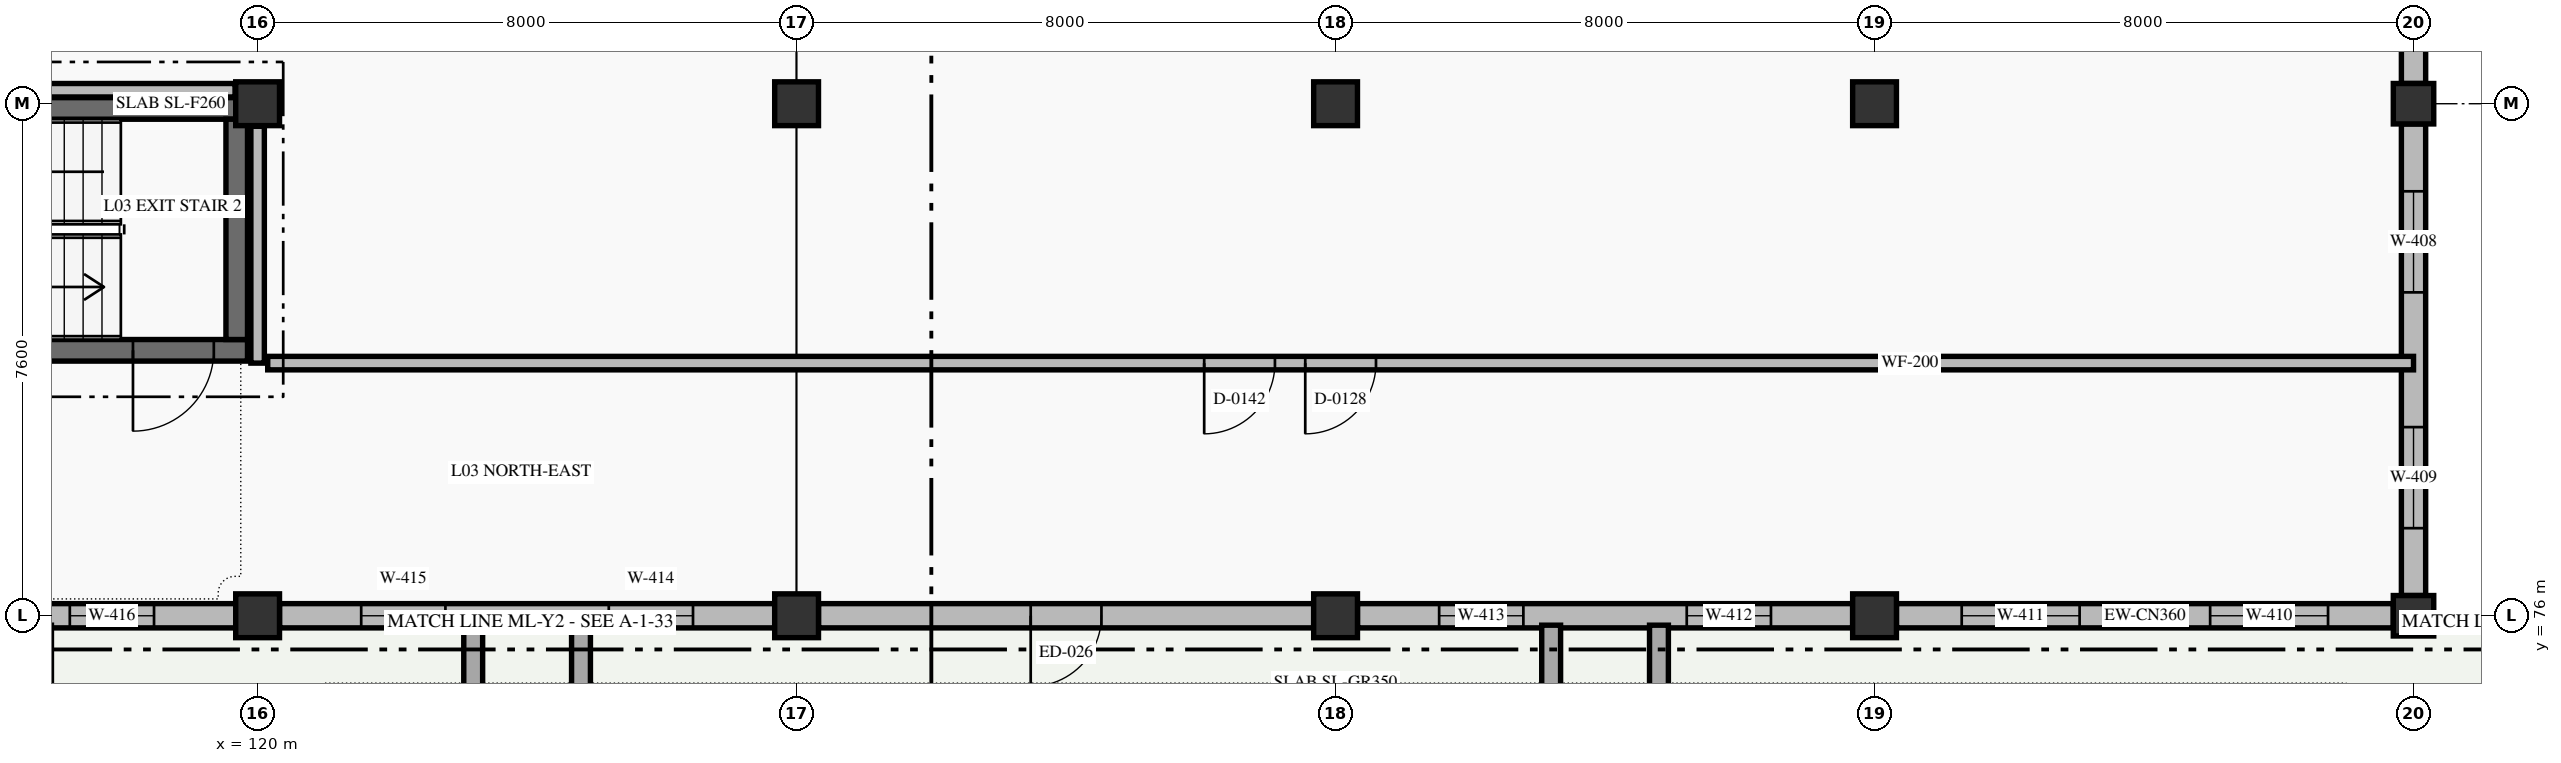
"""IFC4 building model, lengths in metres.
Left out: names, types, materials, properties, quantities, classifications, styles, units other than length and angle.
Written with IfcOpenShell. Run it as: python <this file> out.ifc"""

import sys

from ifc_helpers import new_model, si_unit, direction, frame, frame_2d, origin, origin_2d, place, context, subcontext, project, spatial, rectangle, extrude, element, fill, save


model = new_model("IFC4")
c1 = context("Model", 3, precision=1e-05, world=origin(), true_north=direction((0.0, 1.0)))
c2 = subcontext(c1, "Body", "Model", "MODEL_VIEW")
j1 = project(units=[si_unit("LENGTHUNIT", "METRE"), si_unit("PLANEANGLEUNIT", "RADIAN")], contexts=[c1])
p1 = place(None, origin())
s1 = spatial("IfcSite", under=j1, at=p1, CompositionType="ELEMENT")
p2 = place(p1, origin())
s2 = spatial("IfcBuilding", under=s1, at=p2, CompositionType="ELEMENT")
p3 = place(p2, frame((0.0, 0.0, 10.2)))
s3 = spatial("IfcBuildingStorey", under=s2, at=p3, CompositionType="ELEMENT", Elevation=10.2)
for number, where, z_axis, x_axis in (
    (1, (120.0, 76.0, 0.0), (0.0, 0.0, 1.0), (1.0, 0.0, 0.0)),
    (2, (120.0, 83.6, 0.0), (0.0, 0.0, 1.0), (1.0, 0.0, 0.0)),
    (3, (128.0, 76.0, 0.0), (0.0, 0.0, 1.0), (1.0, 0.0, 0.0)),
    (4, (128.0, 83.6, 0.0), (0.0, 0.0, 1.0), (1.0, 0.0, 0.0)),
    (5, (136.0, 76.0, 0.0), (0.0, 0.0, 1.0), (1.0, 0.0, 0.0)),
    (6, (136.0, 83.6, 0.0), (0.0, 0.0, 1.0), (1.0, 0.0, 0.0)),
    (7, (144.0, 76.0, 0.0), (0.0, 0.0, 1.0), (1.0, 0.0, 0.0)),
    (8, (144.0, 83.6, 0.0), (0.0, 0.0, 1.0), (1.0, 0.0, 0.0)),
):
    element("IfcColumn", number, at=place(p3, frame(where, z_axis=z_axis, x_axis=x_axis)), inside=s3, PredefinedType="COLUMN", context=c2, shape_type="SweptSolid", body=[
        extrude(rectangle(XDim=0.65, YDim=0.65, at=origin_2d()), origin(), (0.0, 0.0, 1.0), 4.5),
    ])
for number, where, z_axis, x_axis in (
    (9, (152.0, 76.0, 0.0), (0.0, 0.0, 1.0), (1.0, 0.0, 0.0)),
    (10, (152.0, 83.6, 0.0), (0.0, 0.0, 1.0), (1.0, 0.0, 0.0)),
):
    element("IfcColumn", number, at=place(p3, frame(where, z_axis=z_axis, x_axis=x_axis)), inside=s3, PredefinedType="COLUMN", context=c2, shape_type="SweptSolid", body=[
        extrude(rectangle(XDim=0.6, YDim=0.6, at=origin_2d()), origin(), (0.0, 0.0, 1.0), 4.5),
    ])
p4 = place(p3, frame((152.0, 90.9, 0.0), z_axis=(0.0, 0.0, 1.0), x_axis=(0.0, -1.0, 0.0)))
e11 = element("IfcWall", 11, at=p4, inside=s3, PredefinedType="STANDARD", context=c2, shape_type="SweptSolid", body=[
    extrude(rectangle(XDim=7.0, YDim=0.36, at=frame_2d((3.5, 0.0))), origin(), (0.0, 0.0, 1.0), 4.22),
])
p5 = place(p4, frame((1.0, 0.0, 0.9)))
e12 = element("IfcOpeningElement", 12, at=p5, cuts=e11, PredefinedType="OPENING", context=c2, shape_type="SweptSolid", body=[
    extrude(rectangle(XDim=1.5, YDim=2.0, at=frame_2d((0.75, 1.0))), frame((0.0, 0.19, 0.0), z_axis=(0.0, -1.0, 0.0), x_axis=(1.0, 0.0, 0.0)), (0.0, 0.0, 1.0), 0.38),
])
p6 = place(p4, frame((4.5, 0.0, 0.9)))
e13 = element("IfcOpeningElement", 13, at=p6, cuts=e11, PredefinedType="OPENING", context=c2, shape_type="SweptSolid", body=[
    extrude(rectangle(XDim=1.5, YDim=2.0, at=frame_2d((0.75, 1.0))), frame((0.0, 0.19, 0.0), z_axis=(0.0, -1.0, 0.0), x_axis=(1.0, 0.0, 0.0)), (0.0, 0.0, 1.0), 0.38),
])
p7 = place(p3, frame((152.0, 83.3, 0.0), z_axis=(0.0, 0.0, 1.0), x_axis=(0.0, -1.0, 0.0)))
e14 = element("IfcWall", 14, at=p7, inside=s3, PredefinedType="STANDARD", context=c2, shape_type="SweptSolid", body=[
    extrude(rectangle(XDim=7.0, YDim=0.36, at=frame_2d((3.5, 0.0))), origin(), (0.0, 0.0, 1.0), 4.22),
])
p8 = place(p7, frame((1.0, 0.0, 0.9)))
e15 = element("IfcOpeningElement", 15, at=p8, cuts=e14, PredefinedType="OPENING", context=c2, shape_type="SweptSolid", body=[
    extrude(rectangle(XDim=1.5, YDim=2.0, at=frame_2d((0.75, 1.0))), frame((0.0, 0.19, 0.0), z_axis=(0.0, -1.0, 0.0), x_axis=(1.0, 0.0, 0.0)), (0.0, 0.0, 1.0), 0.38),
])
p9 = place(p7, frame((4.5, 0.0, 0.9)))
e16 = element("IfcOpeningElement", 16, at=p9, cuts=e14, PredefinedType="OPENING", context=c2, shape_type="SweptSolid", body=[
    extrude(rectangle(XDim=1.5, YDim=2.0, at=frame_2d((0.75, 1.0))), frame((0.0, 0.19, 0.0), z_axis=(0.0, -1.0, 0.0), x_axis=(1.0, 0.0, 0.0)), (0.0, 0.0, 1.0), 0.38),
])
p10 = place(p3, frame((151.7, 76.0, 0.0), z_axis=(0.0, 0.0, 1.0), x_axis=(-1.0, 0.0, 0.0)))
e17 = element("IfcWall", 17, at=p10, inside=s3, PredefinedType="STANDARD", context=c2, shape_type="SweptSolid", body=[
    extrude(rectangle(XDim=7.375, YDim=0.36, at=frame_2d((3.688, 0.0))), origin(), (0.0, 0.0, 1.0), 4.22),
])
p11 = place(p10, frame((0.969, 0.0, 0.9)))
e18 = element("IfcOpeningElement", 18, at=p11, cuts=e17, PredefinedType="OPENING", context=c2, shape_type="SweptSolid", body=[
    extrude(rectangle(XDim=1.75, YDim=2.45, at=frame_2d((0.875, 1.225))), frame((0.0, 0.19, 0.0), z_axis=(0.0, -1.0, 0.0), x_axis=(1.0, 0.0, 0.0)), (0.0, 0.0, 1.0), 0.38),
])
p12 = place(p10, frame((4.656, 0.0, 0.9)))
e19 = element("IfcOpeningElement", 19, at=p12, cuts=e17, PredefinedType="OPENING", context=c2, shape_type="SweptSolid", body=[
    extrude(rectangle(XDim=1.75, YDim=2.45, at=frame_2d((0.875, 1.225))), frame((0.0, 0.19, 0.0), z_axis=(0.0, -1.0, 0.0), x_axis=(1.0, 0.0, 0.0)), (0.0, 0.0, 1.0), 0.38),
])
p13 = place(p3, frame((143.675, 76.0, 0.0), z_axis=(0.0, 0.0, 1.0), x_axis=(-1.0, 0.0, 0.0)))
e20 = element("IfcWall", 20, at=p13, inside=s3, PredefinedType="STANDARD", context=c2, shape_type="SweptSolid", body=[
    extrude(rectangle(XDim=7.35, YDim=0.36, at=frame_2d((3.675, 0.0))), origin(), (0.0, 0.0, 1.0), 3.47),
])
p14 = place(p13, frame((1.212, 0.0, 2.22)))
e21 = element("IfcOpeningElement", 21, at=p14, cuts=e20, PredefinedType="OPENING", context=c2, shape_type="SweptSolid", body=[
    extrude(rectangle(XDim=1.25, YDim=0.95, at=frame_2d((0.625, 0.475))), frame((0.0, 0.19, 0.0), z_axis=(0.0, -1.0, 0.0), x_axis=(1.0, 0.0, 0.0)), (0.0, 0.0, 1.0), 0.38),
])
p15 = place(p13, frame((4.887, 0.0, 2.22)))
e22 = element("IfcOpeningElement", 22, at=p15, cuts=e20, PredefinedType="OPENING", context=c2, shape_type="SweptSolid", body=[
    extrude(rectangle(XDim=1.25, YDim=0.95, at=frame_2d((0.625, 0.475))), frame((0.0, 0.19, 0.0), z_axis=(0.0, -1.0, 0.0), x_axis=(1.0, 0.0, 0.0)), (0.0, 0.0, 1.0), 0.38),
])
p16 = place(p3, frame((135.675, 76.0, 0.0), z_axis=(0.0, 0.0, 1.0), x_axis=(-1.0, 0.0, 0.0)))
e23 = element("IfcWall", 23, at=p16, inside=s3, PredefinedType="STANDARD", context=c2, shape_type="SweptSolid", body=[
    extrude(rectangle(XDim=7.35, YDim=0.36, at=frame_2d((3.675, 0.0))), origin(), (0.0, 0.0, 1.0), 3.47),
])
p17 = place(p16, frame((3.15, 0.0, 0.0)))
e24 = element("IfcOpeningElement", 24, at=p17, cuts=e23, PredefinedType="OPENING", context=c2, shape_type="SweptSolid", body=[
    extrude(rectangle(XDim=1.05, YDim=2.2, at=frame_2d((0.525, 1.1))), frame((0.0, 0.19, 0.0), z_axis=(0.0, -1.0, 0.0), x_axis=(1.0, 0.0, 0.0)), (0.0, 0.0, 1.0), 0.38),
])
p18 = place(p3, frame((127.675, 76.0, 0.0), z_axis=(0.0, 0.0, 1.0), x_axis=(-1.0, 0.0, 0.0)))
e25 = element("IfcWall", 25, at=p18, inside=s3, PredefinedType="STANDARD", context=c2, shape_type="SweptSolid", body=[
    extrude(rectangle(XDim=7.35, YDim=0.36, at=frame_2d((3.675, 0.0))), origin(), (0.0, 0.0, 1.0), 3.47),
])
p19 = place(p18, frame((1.212, 0.0, 2.22)))
e26 = element("IfcOpeningElement", 26, at=p19, cuts=e25, PredefinedType="OPENING", context=c2, shape_type="SweptSolid", body=[
    extrude(rectangle(XDim=1.25, YDim=0.95, at=frame_2d((0.625, 0.475))), frame((0.0, 0.19, 0.0), z_axis=(0.0, -1.0, 0.0), x_axis=(1.0, 0.0, 0.0)), (0.0, 0.0, 1.0), 0.38),
])
p20 = place(p18, frame((4.887, 0.0, 2.22)))
e27 = element("IfcOpeningElement", 27, at=p20, cuts=e25, PredefinedType="OPENING", context=c2, shape_type="SweptSolid", body=[
    extrude(rectangle(XDim=1.25, YDim=0.95, at=frame_2d((0.625, 0.475))), frame((0.0, 0.19, 0.0), z_axis=(0.0, -1.0, 0.0), x_axis=(1.0, 0.0, 0.0)), (0.0, 0.0, 1.0), 0.38),
])
p21 = place(p3, frame((119.675, 76.0, 0.0), z_axis=(0.0, 0.0, 1.0), x_axis=(-1.0, 0.0, 0.0)))
e28 = element("IfcWall", 28, at=p21, inside=s3, PredefinedType="STANDARD", context=c2, shape_type="SweptSolid", body=[
    extrude(rectangle(XDim=7.35, YDim=0.36, at=frame_2d((3.675, 0.0))), origin(), (0.0, 0.0, 1.0), 3.47),
])
p22 = place(p21, frame((1.212, 0.0, 2.22)))
e29 = element("IfcOpeningElement", 29, at=p22, cuts=e28, PredefinedType="OPENING", context=c2, shape_type="SweptSolid", body=[
    extrude(rectangle(XDim=1.25, YDim=0.95, at=frame_2d((0.625, 0.475))), frame((0.0, 0.19, 0.0), z_axis=(0.0, -1.0, 0.0), x_axis=(1.0, 0.0, 0.0)), (0.0, 0.0, 1.0), 0.38),
])
p23 = place(p21, frame((4.887, 0.0, 2.22)))
e30 = element("IfcOpeningElement", 30, at=p23, cuts=e28, PredefinedType="OPENING", context=c2, shape_type="SweptSolid", body=[
    extrude(rectangle(XDim=1.25, YDim=0.95, at=frame_2d((0.625, 0.475))), frame((0.0, 0.19, 0.0), z_axis=(0.0, -1.0, 0.0), x_axis=(1.0, 0.0, 0.0)), (0.0, 0.0, 1.0), 0.38),
])
p24 = place(p3, frame((119.85, 79.94, 0.0), z_axis=(0.0, 0.0, 1.0), x_axis=(-1.0, 0.0, 0.0)))
e31 = element("IfcWall", 31, at=p24, inside=s3, PredefinedType="SHEAR", context=c2, shape_type="SweptSolid", body=[
    extrude(rectangle(XDim=7.7, YDim=0.32, at=frame_2d((3.85, 0.0))), origin(), (0.0, 0.0, 1.0), 4.5),
])
p25 = place(p24, frame((0.5, 0.0, 0.0)))
e32 = element("IfcOpeningElement", 32, at=p25, cuts=e31, PredefinedType="OPENING", context=c2, shape_type="SweptSolid", body=[
    extrude(rectangle(XDim=1.2, YDim=2.2, at=frame_2d((0.6, 1.1))), frame((0.0, 0.17, 0.0), z_axis=(0.0, -1.0, 0.0), x_axis=(1.0, 0.0, 0.0)), (0.0, 0.0, 1.0), 0.34),
])
p26 = place(p3, frame((112.15, 83.53, 0.0), z_axis=(0.0, 0.0, 1.0), x_axis=(1.0, 0.0, 0.0)))
e33 = element("IfcWall", 33, at=p26, inside=s3, PredefinedType="SHEAR", context=c2, shape_type="SweptSolid", body=[
    extrude(rectangle(XDim=7.7, YDim=0.32, at=frame_2d((3.85, 0.0))), origin(), (0.0, 0.0, 1.0), 4.5),
])
p27 = place(p3, frame((119.69, 83.37, 0.0), z_axis=(0.0, 0.0, 1.0), x_axis=(0.0, -1.0, 0.0)))
e34 = element("IfcWall", 34, at=p27, inside=s3, PredefinedType="SHEAR", context=c2, shape_type="SweptSolid", body=[
    extrude(rectangle(XDim=3.27, YDim=0.32, at=frame_2d((1.635, 0.0))), origin(), (0.0, 0.0, 1.0), 4.5),
])
p28 = place(p3, frame((112.335, 83.8, 0.0), z_axis=(0.0, 0.0, 1.0), x_axis=(1.0, 0.0, 0.0)))
e35 = element("IfcWall", 35, at=p28, inside=s3, PredefinedType="STANDARD", context=c2, shape_type="SweptSolid", body=[
    extrude(rectangle(XDim=7.33, YDim=0.2, at=frame_2d((3.665, 0.0))), origin(), (0.0, 0.0, 1.0), 3.47),
])
p29 = place(p3, frame((120.0, 83.265, 0.0), z_axis=(0.0, 0.0, 1.0), x_axis=(0.0, -1.0, 0.0)))
e36 = element("IfcWall", 36, at=p29, inside=s3, PredefinedType="STANDARD", context=c2, shape_type="SweptSolid", body=[
    extrude(rectangle(XDim=3.515, YDim=0.2, at=frame_2d((1.757, 0.0))), origin(), (0.0, 0.0, 1.0), 3.67),
])
p30 = place(p3, frame((152.0, 79.75, 0.0), z_axis=(0.0, 0.0, 1.0), x_axis=(-1.0, 0.0, 0.0)))
e37 = element("IfcWall", 37, at=p30, inside=s3, PredefinedType="STANDARD", context=c2, shape_type="SweptSolid", body=[
    extrude(rectangle(XDim=31.85, YDim=0.2, at=frame_2d((15.925, 0.0))), origin(), (0.0, 0.0, 1.0), 4.26),
])
p31 = place(p30, frame((15.4, 0.0, 0.0)))
e38 = element("IfcOpeningElement", 38, at=p31, cuts=e37, PredefinedType="OPENING", context=c2, shape_type="SweptSolid", body=[
    extrude(rectangle(XDim=1.05, YDim=2.15, at=frame_2d((0.525, 1.075))), frame((0.0, 0.11, 0.0), z_axis=(0.0, -1.0, 0.0), x_axis=(1.0, 0.0, 0.0)), (0.0, 0.0, 1.0), 0.22),
])
p32 = place(p30, frame((16.9, 0.0, 0.0)))
e39 = element("IfcOpeningElement", 39, at=p32, cuts=e37, PredefinedType="OPENING", context=c2, shape_type="SweptSolid", body=[
    extrude(rectangle(XDim=1.05, YDim=2.15, at=frame_2d((0.525, 1.075))), frame((0.0, 0.11, 0.0), z_axis=(0.0, -1.0, 0.0), x_axis=(1.0, 0.0, 0.0)), (0.0, 0.0, 1.0), 0.22),
])
p33 = place(p8, origin())
e40 = element("IfcWindow", 40, at=p33, inside=s3, PartitioningType="DOUBLE_PANEL_VERTICAL", PredefinedType="WINDOW", context=c2, shape_type="SweptSolid", body=[
    extrude(rectangle(XDim=1.5, YDim=2.0, at=frame_2d((0.75, 1.0))), frame((0.0, 0.03, 0.0), z_axis=(0.0, -1.0, 0.0), x_axis=(1.0, 0.0, 0.0)), (0.0, 0.0, 1.0), 0.06),
])
fill(e15, e40)
p34 = place(p9, origin())
e41 = element("IfcWindow", 41, at=p34, inside=s3, PartitioningType="DOUBLE_PANEL_VERTICAL", PredefinedType="WINDOW", context=c2, shape_type="SweptSolid", body=[
    extrude(rectangle(XDim=1.5, YDim=2.0, at=frame_2d((0.75, 1.0))), frame((0.0, 0.03, 0.0), z_axis=(0.0, -1.0, 0.0), x_axis=(1.0, 0.0, 0.0)), (0.0, 0.0, 1.0), 0.06),
])
fill(e16, e41)
p35 = place(p11, origin())
e42 = element("IfcWindow", 42, at=p35, inside=s3, PartitioningType="DOUBLE_PANEL_VERTICAL", PredefinedType="WINDOW", context=c2, shape_type="SweptSolid", body=[
    extrude(rectangle(XDim=1.75, YDim=2.45, at=frame_2d((0.875, 1.225))), frame((0.0, 0.03, 0.0), z_axis=(0.0, -1.0, 0.0), x_axis=(1.0, 0.0, 0.0)), (0.0, 0.0, 1.0), 0.06),
])
fill(e18, e42)
p36 = place(p12, origin())
e43 = element("IfcWindow", 43, at=p36, inside=s3, PartitioningType="DOUBLE_PANEL_VERTICAL", PredefinedType="WINDOW", context=c2, shape_type="SweptSolid", body=[
    extrude(rectangle(XDim=1.75, YDim=2.45, at=frame_2d((0.875, 1.225))), frame((0.0, 0.03, 0.0), z_axis=(0.0, -1.0, 0.0), x_axis=(1.0, 0.0, 0.0)), (0.0, 0.0, 1.0), 0.06),
])
fill(e19, e43)
p37 = place(p14, origin())
e44 = element("IfcWindow", 44, at=p37, inside=s3, PartitioningType="SINGLE_PANEL", PredefinedType="WINDOW", context=c2, shape_type="SweptSolid", body=[
    extrude(rectangle(XDim=1.25, YDim=0.95, at=frame_2d((0.625, 0.475))), frame((0.0, 0.03, 0.0), z_axis=(0.0, -1.0, 0.0), x_axis=(1.0, 0.0, 0.0)), (0.0, 0.0, 1.0), 0.06),
])
fill(e21, e44)
p38 = place(p15, origin())
e45 = element("IfcWindow", 45, at=p38, inside=s3, PartitioningType="SINGLE_PANEL", PredefinedType="WINDOW", context=c2, shape_type="SweptSolid", body=[
    extrude(rectangle(XDim=1.25, YDim=0.95, at=frame_2d((0.625, 0.475))), frame((0.0, 0.03, 0.0), z_axis=(0.0, -1.0, 0.0), x_axis=(1.0, 0.0, 0.0)), (0.0, 0.0, 1.0), 0.06),
])
fill(e22, e45)
p39 = place(p17, origin())
e46 = element("IfcDoor", 46, at=p39, inside=s3, OperationType="SINGLE_SWING_RIGHT", PredefinedType="DOOR", context=c2, shape_type="SweptSolid", body=[
    extrude(rectangle(XDim=1.05, YDim=2.2, at=frame_2d((0.525, 1.1))), frame((0.0, 0.025, 0.0), z_axis=(0.0, -1.0, 0.0), x_axis=(1.0, 0.0, 0.0)), (0.0, 0.0, 1.0), 0.05),
])
fill(e24, e46)
p40 = place(p19, origin())
e47 = element("IfcWindow", 47, at=p40, inside=s3, PartitioningType="SINGLE_PANEL", PredefinedType="WINDOW", context=c2, shape_type="SweptSolid", body=[
    extrude(rectangle(XDim=1.25, YDim=0.95, at=frame_2d((0.625, 0.475))), frame((0.0, 0.03, 0.0), z_axis=(0.0, -1.0, 0.0), x_axis=(1.0, 0.0, 0.0)), (0.0, 0.0, 1.0), 0.06),
])
fill(e26, e47)
p41 = place(p20, origin())
e48 = element("IfcWindow", 48, at=p41, inside=s3, PartitioningType="SINGLE_PANEL", PredefinedType="WINDOW", context=c2, shape_type="SweptSolid", body=[
    extrude(rectangle(XDim=1.25, YDim=0.95, at=frame_2d((0.625, 0.475))), frame((0.0, 0.03, 0.0), z_axis=(0.0, -1.0, 0.0), x_axis=(1.0, 0.0, 0.0)), (0.0, 0.0, 1.0), 0.06),
])
fill(e27, e48)
p42 = place(p22, origin())
e49 = element("IfcWindow", 49, at=p42, inside=s3, PartitioningType="SINGLE_PANEL", PredefinedType="WINDOW", context=c2, shape_type="SweptSolid", body=[
    extrude(rectangle(XDim=1.25, YDim=0.95, at=frame_2d((0.625, 0.475))), frame((0.0, 0.03, 0.0), z_axis=(0.0, -1.0, 0.0), x_axis=(1.0, 0.0, 0.0)), (0.0, 0.0, 1.0), 0.06),
])
fill(e29, e49)
p43 = place(p25, origin())
e50 = element("IfcDoor", 50, at=p43, inside=s3, OperationType="SINGLE_SWING_RIGHT", PredefinedType="DOOR", context=c2, shape_type="SweptSolid", body=[
    extrude(rectangle(XDim=1.2, YDim=2.2, at=frame_2d((0.6, 1.1))), frame((0.0, 0.025, 0.0), z_axis=(0.0, -1.0, 0.0), x_axis=(1.0, 0.0, 0.0)), (0.0, 0.0, 1.0), 0.05),
])
fill(e32, e50)
p44 = place(p31, origin())
e51 = element("IfcDoor", 51, at=p44, inside=s3, OperationType="SINGLE_SWING_RIGHT", PredefinedType="DOOR", context=c2, shape_type="SweptSolid", body=[
    extrude(rectangle(XDim=1.05, YDim=2.15, at=frame_2d((0.525, 1.075))), frame((0.0, 0.025, 0.0), z_axis=(0.0, -1.0, 0.0), x_axis=(1.0, 0.0, 0.0)), (0.0, 0.0, 1.0), 0.05),
])
fill(e38, e51)
p45 = place(p32, origin())
e52 = element("IfcDoor", 52, at=p45, inside=s3, OperationType="SINGLE_SWING_RIGHT", PredefinedType="DOOR", context=c2, shape_type="SweptSolid", body=[
    extrude(rectangle(XDim=1.05, YDim=2.15, at=frame_2d((0.525, 1.075))), frame((0.0, 0.025, 0.0), z_axis=(0.0, -1.0, 0.0), x_axis=(1.0, 0.0, 0.0)), (0.0, 0.0, 1.0), 0.05),
])
fill(e39, e52)
save(model, sys.argv[1])
